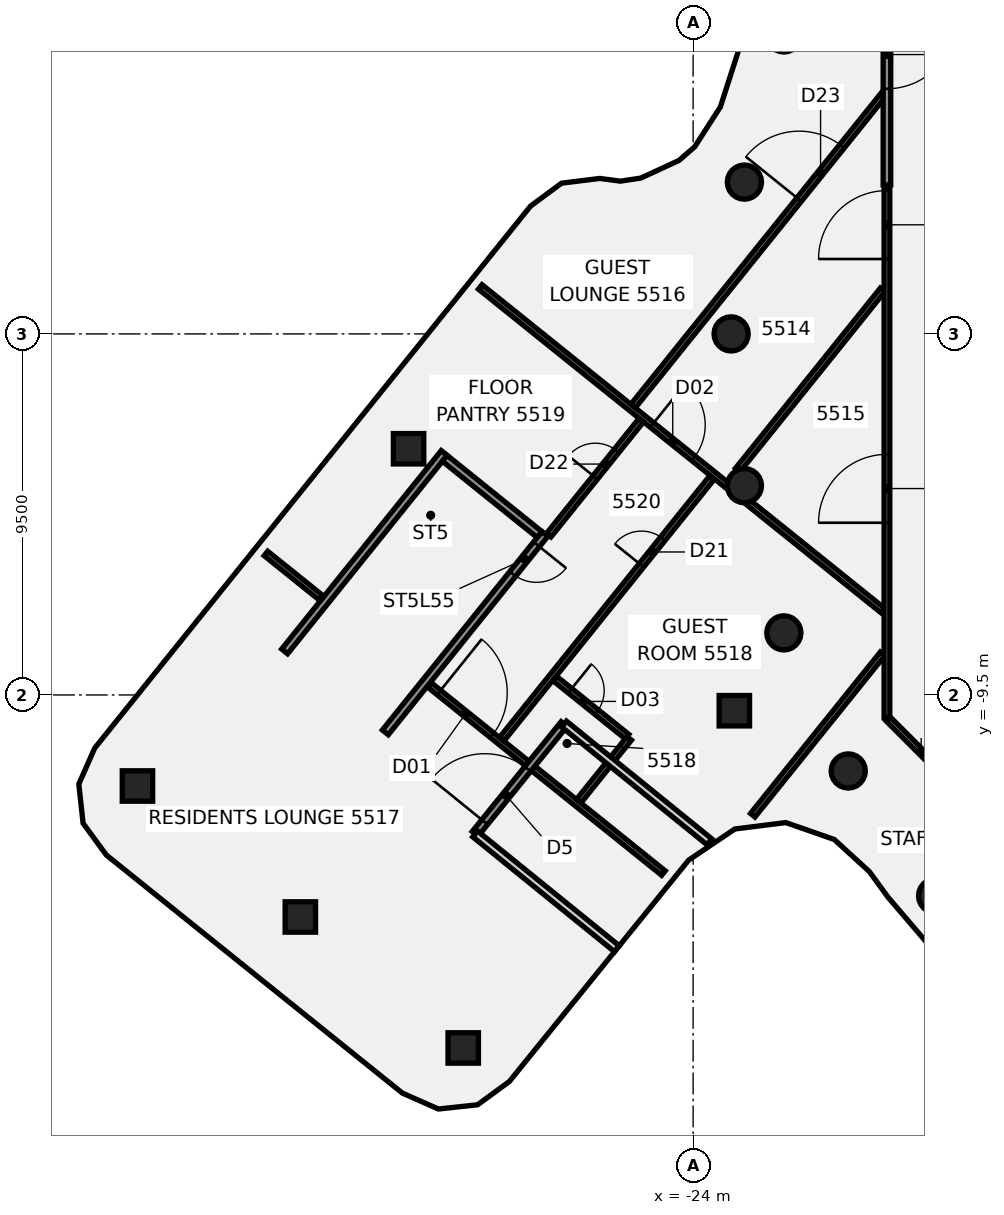
"""IFC4 building model, lengths in metres.
Left out: names, types, materials, properties, quantities, classifications, styles, units other than length and angle.
Written with IfcOpenShell. Run it as: python <this file> out.ifc"""

import sys

from ifc_helpers import new_model, si_unit, direction, frame, frame_2d, origin, origin_2d, place, context, subcontext, project, spatial, polyline, rectangle, circle, outline, extrude, element, fill, save


model = new_model("IFC4")
c1 = context("Model", 3, precision=1e-05, world=origin(), true_north=direction((0.0, 1.0)))
c2 = subcontext(c1, "Body", "Model", "MODEL_VIEW")
j1 = project(units=[si_unit("LENGTHUNIT", "METRE"), si_unit("PLANEANGLEUNIT", "RADIAN")], contexts=[c1])
p1 = place(None, origin())
s1 = spatial("IfcSite", under=j1, at=p1, CompositionType="ELEMENT")
p2 = place(p1, origin())
s2 = spatial("IfcBuilding", under=s1, at=p2, CompositionType="ELEMENT")
p3 = place(p2, frame((0.0, 0.0, 219.9)))
s3 = spatial("IfcBuildingStorey", under=s2, at=p3, CompositionType="ELEMENT", Elevation=219.9)
for number, where, z_axis, x_axis in (
    (1, (-22.651, 3.994, -0.14), (0.0, 0.0, 1.0), (1.0, 0.0, 0.0)),
    (2, (-23.0, 0.0, -0.14), (0.0, 0.0, 1.0), (1.0, 0.0, 0.0)),
    (3, (-22.651, -3.994, -0.14), (0.0, 0.0, 1.0), (1.0, 0.0, 0.0)),
    (4, (-21.613, -7.866, -0.14), (0.0, 0.0, 1.0), (1.0, 0.0, 0.0)),
    (5, (-19.919, -11.5, -0.14), (0.0, 0.0, 1.0), (1.0, 0.0, 0.0)),
    (6, (-17.619, -14.784, -0.14), (0.0, 0.0, 1.0), (1.0, 0.0, 0.0)),
):
    element("IfcColumn", number, at=place(p3, frame(where, z_axis=z_axis, x_axis=x_axis)), inside=s3, PredefinedType="COLUMN", context=c2, shape_type="SweptSolid", body=[
        extrude(circle(Radius=0.45, at=origin_2d()), origin(), (0.0, 0.0, 1.0), 3.6),
    ])
p4 = place(p3, frame((-22.915, -9.915, -0.134), z_axis=(0.050218113387, -0.004139601239, 0.998729695558), x_axis=(-0.7786689847, 0.626044507658, 0.04174789452)))
e7 = element("IfcColumn", 7, at=p4, inside=s3, PredefinedType="COLUMN", context=c2, shape_type="SweptSolid", body=[
    extrude(rectangle(XDim=0.8, YDim=0.8, at=origin_2d()), origin(), (0.0, 0.0, 1.0), 3.598),
])
p5 = place(p3, frame((-31.487, -3.022, -0.135), z_axis=(0.015743007279, -0.047839741947, 0.998730953166), x_axis=(0.626502812053, 0.778936132704, 0.027435882672)))
e8 = element("IfcColumn", 8, at=p5, inside=s3, PredefinedType="COLUMN", context=c2, shape_type="SweptSolid", body=[
    extrude(rectangle(XDim=0.8, YDim=0.8, at=origin_2d()), origin(), (0.0, 0.0, 1.0), 3.598),
])
p6 = place(p3, frame((-38.622, -11.896, -0.125), z_axis=(0.110836507046, -0.018348621509, 0.993669259258), x_axis=(-0.773649156908, 0.626012359155, 0.097854525701)))
e9 = element("IfcColumn", 9, at=p6, inside=s3, PredefinedType="COLUMN", context=c2, shape_type="SweptSolid", body=[
    extrude(rectangle(XDim=0.8, YDim=0.8, at=origin_2d()), origin(), (0.0, 0.0, 1.0), 3.606),
])
p7 = place(p3, frame((-34.336, -15.342, -0.127), z_axis=(0.127732671233, 0.003444931905, 0.991802650301), x_axis=(-0.773203207147, 0.626633422835, 0.097403048434)))
e10 = element("IfcColumn", 10, at=p7, inside=s3, PredefinedType="COLUMN", context=c2, shape_type="SweptSolid", body=[
    extrude(rectangle(XDim=0.8, YDim=0.8, at=origin_2d()), origin(), (0.0, 0.0, 1.0), 3.614),
])
p8 = place(p3, frame((-30.05, -18.788, -0.129), z_axis=(0.144430563508, 0.025048097727, 0.989197859442), x_axis=(-0.772342054291, 0.627776746317, 0.096871605529)))
e11 = element("IfcColumn", 11, at=p8, inside=s3, PredefinedType="COLUMN", context=c2, shape_type="SweptSolid", body=[
    extrude(rectangle(XDim=0.8, YDim=0.8, at=origin_2d()), origin(), (0.0, 0.0, 1.0), 3.626),
])
p9 = place(p3, frame((-18.872, -10.128, 0.0), z_axis=(0.0, 0.0, 1.0), x_axis=(0.707106781187, -0.707106781187, 0.0)))
e12 = element("IfcWall", 12, at=p9, inside=s3, PredefinedType="PARTITIONING", context=c2, shape_type="SweptSolid", body=[
    extrude(rectangle(XDim=2.465, YDim=0.15, at=frame_2d((1.232, 0.0))), origin(), (0.0, 0.0, 1.0), 2.864),
])
p10 = place(p3, frame((-35.242, -5.777, 0.0), z_axis=(0.0, 0.0, 1.0), x_axis=(0.779380699449, -0.626550656632, 0.0)))
e13 = element("IfcWall", 13, at=p10, inside=s3, PredefinedType="PARTITIONING", context=c2, shape_type="SweptSolid", body=[
    extrude(rectangle(XDim=1.859, YDim=0.15, at=frame_2d((0.93, 0.0))), origin(), (0.0, 0.0, 1.0), 2.864),
])
p11 = place(p3, frame((-30.925, -9.247, 0.0), z_axis=(0.0, 0.0, 1.0), x_axis=(0.779383084093, -0.626547690308, 0.0)))
e14 = element("IfcWall", 14, at=p11, inside=s3, PredefinedType="PARTITIONING", context=c2, shape_type="SweptSolid", body=[
    extrude(rectangle(XDim=7.883, YDim=0.15, at=frame_2d((3.942, 0.0))), origin(), (0.0, 0.0, 1.0), 2.864),
])
p12 = place(p11, frame((0.3, 0.0, 0.0)))
e15 = element("IfcOpeningElement", 15, at=p12, cuts=e14, PredefinedType="OPENING", context=c2, shape_type="SweptSolid", body=[
    extrude(rectangle(XDim=1.8, YDim=2.1, at=frame_2d((0.9, 1.05))), frame((0.0, 0.085, 0.0), z_axis=(0.0, -1.0, 0.0), x_axis=(1.0, 0.0, 0.0)), (0.0, 0.0, 1.0), 0.17),
])
p13 = place(p3, frame((-29.602, 1.236, 0.0), z_axis=(0.0, 0.0, 1.0), x_axis=(0.779408775424, -0.626515730681, 0.0)))
e16 = element("IfcWall", 16, at=p13, inside=s3, PredefinedType="PARTITIONING", context=c2, shape_type="SweptSolid", body=[
    extrude(rectangle(XDim=8.332, YDim=0.15, at=frame_2d((4.166, 0.0))), origin(), (0.0, 0.0, 1.0), 2.864),
])
p14 = place(p13, frame((5.799, 0.0, 0.0)))
e17 = element("IfcOpeningElement", 17, at=p14, cuts=e16, PredefinedType="OPENING", context=c2, shape_type="SweptSolid", body=[
    extrude(rectangle(XDim=1.4, YDim=2.1, at=frame_2d((0.7, 1.05))), frame((0.0, 0.085, 0.0), z_axis=(0.0, -1.0, 0.0), x_axis=(1.0, 0.0, 0.0)), (0.0, 0.0, 1.0), 0.17),
])
p15 = place(p3, frame((-22.555, -4.428, 0.0), z_axis=(0.0, 0.0, 1.0), x_axis=(0.779423896045, -0.626496919604, 0.0)))
e18 = element("IfcWall", 18, at=p15, inside=s3, PredefinedType="PARTITIONING", context=c2, shape_type="SweptSolid", body=[
    extrude(rectangle(XDim=4.556, YDim=0.15, at=frame_2d((2.278, 0.0))), origin(), (0.0, 0.0, 1.0), 2.864),
])
p16 = place(p3, frame((-27.646, -9.062, 0.0), z_axis=(0.0, 0.0, 1.0), x_axis=(0.779279142781, -0.626676964334, 0.0)))
e19 = element("IfcWall", 19, at=p16, inside=s3, PredefinedType="PARTITIONING", context=c2, shape_type="SweptSolid", body=[
    extrude(rectangle(XDim=2.446, YDim=0.15, at=frame_2d((1.223, 0.0))), origin(), (0.0, 0.0, 1.0), 2.864),
])
p17 = place(p16, frame((0.52, 0.0, 0.0)))
e20 = element("IfcOpeningElement", 20, at=p17, cuts=e19, PredefinedType="OPENING", context=c2, shape_type="SweptSolid", body=[
    extrude(rectangle(XDim=0.9, YDim=2.1, at=frame_2d((0.45, 1.05))), frame((0.0, 0.085, 0.0), z_axis=(0.0, -1.0, 0.0), x_axis=(1.0, 0.0, 0.0)), (0.0, 0.0, 1.0), 0.17),
])
p18 = place(p3, frame((-29.036, -10.665, 0.0), z_axis=(0.0, 0.0, 1.0), x_axis=(0.626350653384, 0.779541441493, 0.0)))
e21 = element("IfcWall", 21, at=p18, inside=s3, PredefinedType="PARTITIONING", context=c2, shape_type="SweptSolid", body=[
    extrude(rectangle(XDim=8.84, YDim=0.15, at=frame_2d((4.42, 0.0))), origin(), (0.0, 0.0, 1.0), 2.864),
])
p19 = place(p18, frame((5.87, 0.0, 0.0)))
e22 = element("IfcOpeningElement", 22, at=p19, cuts=e21, PredefinedType="OPENING", context=c2, shape_type="SweptSolid", body=[
    extrude(rectangle(XDim=0.9, YDim=2.1, at=frame_2d((0.45, 1.05))), frame((0.0, 0.085, 0.0), z_axis=(0.0, -1.0, 0.0), x_axis=(1.0, 0.0, 0.0)), (0.0, 0.0, 1.0), 0.17),
])
p20 = place(p3, frame((-27.798, -5.295, 0.0), z_axis=(0.0, 0.0, 1.0), x_axis=(0.626664805056, 0.779288920814, 0.0)))
e23 = element("IfcWall", 23, at=p20, inside=s3, PredefinedType="PARTITIONING", context=c2, shape_type="SweptSolid", body=[
    extrude(rectangle(XDim=3.881, YDim=0.15, at=frame_2d((1.94, 0.0))), origin(), (0.0, 0.0, 1.0), 2.864),
])
p21 = place(p20, frame((1.95, 0.0, 0.0)))
e24 = element("IfcOpeningElement", 24, at=p21, cuts=e23, PredefinedType="OPENING", context=c2, shape_type="SweptSolid", body=[
    extrude(rectangle(XDim=0.9, YDim=2.1, at=frame_2d((0.45, 1.05))), frame((0.0, 0.085, 0.0), z_axis=(0.0, -1.0, 0.0), x_axis=(1.0, 0.0, 0.0)), (0.0, 0.0, 1.0), 0.17),
])
p22 = place(p3, frame((-27.01, -12.294, 0.0), z_axis=(0.0, 0.0, 1.0), x_axis=(0.626939515837, 0.77906793252, 0.0)))
e25 = element("IfcWall", 25, at=p22, inside=s3, PredefinedType="PARTITIONING", context=c2, shape_type="SweptSolid", body=[
    extrude(rectangle(XDim=2.12, YDim=0.15, at=frame_2d((1.06, 0.0))), origin(), (0.0, 0.0, 1.0), 2.864),
])
p23 = place(p3, frame((-25.578, -1.897, 0.0), z_axis=(0.0, 0.0, 1.0), x_axis=(0.626651590672, 0.779299546971, 0.0)))
e26 = element("IfcWall", 26, at=p23, inside=s3, PredefinedType="PARTITIONING", context=c2, shape_type="SweptSolid", body=[
    extrude(rectangle(XDim=10.656, YDim=0.15, at=frame_2d((5.328, 0.0))), origin(), (0.0, 0.0, 1.0), 2.864),
])
p24 = place(p23, frame((6.97, 0.0, 0.0)))
e27 = element("IfcOpeningElement", 27, at=p24, cuts=e26, PredefinedType="OPENING", context=c2, shape_type="SweptSolid", body=[
    extrude(rectangle(XDim=1.8, YDim=2.1, at=frame_2d((0.9, 1.05))), frame((0.0, 0.085, 0.0), z_axis=(0.0, -1.0, 0.0), x_axis=(1.0, 0.0, 0.0)), (0.0, 0.0, 1.0), 0.17),
])
p25 = place(p3, frame((-22.826, -3.581, 0.0), z_axis=(0.0, 0.0, 1.0), x_axis=(0.626622427276, 0.779322996988, 0.0)))
e28 = element("IfcWall", 28, at=p25, inside=s3, PredefinedType="PARTITIONING", context=c2, shape_type="SweptSolid", body=[
    extrude(rectangle(XDim=6.08, YDim=0.15, at=frame_2d((3.04, 0.0))), origin(), (0.0, 0.0, 1.0), 2.864),
])
p26 = place(p3, frame((-22.432, -12.665, 0.0), z_axis=(0.0, 0.0, 1.0), x_axis=(0.626703070083, 0.779258148464, 0.0)))
e29 = element("IfcWall", 29, at=p26, inside=s3, PredefinedType="PARTITIONING", context=c2, shape_type="SweptSolid", body=[
    extrude(rectangle(XDim=5.451, YDim=0.15, at=frame_2d((2.725, 0.0))), origin(), (0.0, 0.0, 1.0), 2.864),
])
p27 = place(p3, frame((-18.9, -10.1, 0.0), z_axis=(0.0, 0.0, 1.0), x_axis=(0.0, 1.0, 0.0)))
e30 = element("IfcWall", 30, at=p27, inside=s3, PredefinedType="PARTITIONING", context=c2, shape_type="SweptSolid", body=[
    extrude(rectangle(XDim=13.921, YDim=0.15, at=frame_2d((6.96, 0.0))), origin(), (0.0, 0.0, 1.0), 2.864),
])
p28 = place(p27, frame((12.071, 0.0, 0.0)))
e31 = element("IfcOpeningElement", 31, at=p28, cuts=e30, PredefinedType="OPENING", context=c2, shape_type="SweptSolid", body=[
    extrude(rectangle(XDim=1.8, YDim=2.1, at=frame_2d((0.9, 1.05))), frame((0.0, 0.085, 0.0), z_axis=(0.0, -1.0, 0.0), x_axis=(1.0, 0.0, 0.0)), (0.0, 0.0, 1.0), 0.17),
])
p29 = place(p27, frame((5.131, 0.0, 0.0)))
e32 = element("IfcOpeningElement", 32, at=p29, cuts=e30, PredefinedType="OPENING", context=c2, shape_type="SweptSolid", body=[
    extrude(rectangle(XDim=1.8, YDim=2.1, at=frame_2d((0.9, 1.05))), frame((0.0, 0.085, 0.0), z_axis=(0.0, -1.0, 0.0), x_axis=(1.0, 0.0, 0.0)), (0.0, 0.0, 1.0), 0.17),
])
p30 = place(p3, frame((-18.9, 9.5, 0.0), z_axis=(0.0, 0.0, 1.0), x_axis=(0.0, -1.0, 0.0)))
e33 = element("IfcWall", 33, at=p30, inside=s3, PredefinedType="SOLIDWALL", context=c2, shape_type="SweptSolid", body=[
    extrude(rectangle(XDim=5.579, YDim=0.2, at=frame_2d((2.79, 0.0))), origin(), (0.0, 0.0, 1.0), 2.964),
])
p31 = place(p30, frame((1.25, 0.0, 0.0)))
e34 = element("IfcOpeningElement", 34, at=p31, cuts=e33, PredefinedType="OPENING", context=c2, shape_type="SweptSolid", body=[
    extrude(rectangle(XDim=1.8, YDim=2.4, at=frame_2d((0.9, 1.2))), frame((0.0, 0.11, 0.0), z_axis=(0.0, -1.0, 0.0), x_axis=(1.0, 0.0, 0.0)), (0.0, 0.0, 1.0), 0.22),
])
p32 = place(p3, frame((-29.737, -13.156, 0.0), z_axis=(0.0, 0.0, 1.0), x_axis=(0.629422930753, 0.77706291524, 0.0)))
e35 = element("IfcWall", 35, at=p32, inside=s3, PredefinedType="SOLIDWALL", context=c2, shape_type="SweptSolid", body=[
    extrude(rectangle(XDim=3.719, YDim=0.2, at=frame_2d((1.859, 0.0))), origin(), (0.0, 0.0, 1.0), 2.864),
])
p33 = place(p32, frame((0.4, 0.0, 0.0)))
e36 = element("IfcOpeningElement", 36, at=p33, cuts=e35, PredefinedType="OPENING", context=c2, shape_type="SweptSolid", body=[
    extrude(rectangle(XDim=1.8, YDim=2.4, at=frame_2d((0.9, 1.2))), frame((0.0, 0.11, 0.0), z_axis=(0.0, -1.0, 0.0), x_axis=(1.0, 0.0, 0.0)), (0.0, 0.0, 1.0), 0.22),
])
p34 = place(p3, frame((-29.737, -13.156, 0.0), z_axis=(0.0, 0.0, 1.0), x_axis=(0.777068356251, -0.629416213418, 0.0)))
e37 = element("IfcWall", 37, at=p34, inside=s3, PredefinedType="SOLIDWALL", context=c2, shape_type="SweptSolid", body=[
    extrude(rectangle(XDim=4.8, YDim=0.2, at=frame_2d((2.4, 0.0))), origin(), (0.0, 0.0, 1.0), 3.014),
])
p35 = place(p3, frame((-27.396, -10.267, 0.0), z_axis=(0.0, 0.0, 1.0), x_axis=(0.77707382843, -0.629409457483, 0.0)))
e38 = element("IfcWall", 38, at=p35, inside=s3, PredefinedType="SOLIDWALL", context=c2, shape_type="SweptSolid", body=[
    extrude(rectangle(XDim=4.92, YDim=0.2, at=frame_2d((2.46, 0.0))), origin(), (0.0, 0.0, 1.0), 3.014),
])
p36 = place(p3, frame((-27.901, -5.264, -0.14), z_axis=(0.0, 0.0, 1.0), x_axis=(-0.626674952142, -0.779280760932, 0.0)))
e39 = element("IfcWall", 39, at=p36, inside=s3, PredefinedType="SHEAR", context=c2, shape_type="SweptSolid", body=[
    extrude(rectangle(XDim=6.7, YDim=0.2, at=frame_2d((3.35, 0.0))), origin(), (0.0, 0.0, 1.0), 3.004),
])
p37 = place(p36, frame((0.35, 0.0, 0.0)))
e40 = element("IfcOpeningElement", 40, at=p37, cuts=e39, PredefinedType="OPENING", context=c2, shape_type="SweptSolid", body=[
    extrude(rectangle(XDim=1.0, YDim=2.1, at=frame_2d((0.5, 1.05))), frame((0.0, 0.11, 0.0), z_axis=(0.0, -1.0, 0.0), x_axis=(1.0, 0.0, 0.0)), (0.0, 0.0, 1.0), 0.22),
])
p38 = place(p3, frame((-30.551, -3.133, -0.14), z_axis=(0.0, 0.0, 1.0), x_axis=(-0.626652822867, -0.779298556134, 0.0)))
e41 = element("IfcWall", 41, at=p38, inside=s3, PredefinedType="SHEAR", context=c2, shape_type="SweptSolid", body=[
    extrude(rectangle(XDim=6.7, YDim=0.2, at=frame_2d((3.35, 0.0))), origin(), (0.0, 0.0, 1.0), 3.004),
])
p39 = place(p3, frame((-30.535, -3.274, -0.14), z_axis=(0.0, 0.0, 1.0), x_axis=(0.779273387841, -0.626684120592, 0.0)))
e42 = element("IfcWall", 42, at=p39, inside=s3, PredefinedType="SHEAR", context=c2, shape_type="SweptSolid", body=[
    extrude(rectangle(XDim=3.2, YDim=0.2, at=frame_2d((1.6, 0.0))), origin(), (0.0, 0.0, 1.0), 3.004),
])
p40 = place(p3, frame((0.0, 0.0, -0.14)))
e43 = element("IfcWall", 43, at=p40, inside=s3, PredefinedType="SHEAR", context=c2, shape_type="SweptSolid", body=[
    extrude(outline(polyline([(-34.546, -8.261), (-34.671, -8.417), (-32.178, -10.422), (-32.052, -10.266), (-34.546, -8.261)])), origin(), (0.0, 0.0, 1.0), 3.004),
])
p41 = place(p12, frame((1.8, 0.0, 0.0), z_axis=(0.0, 0.0, 1.0), x_axis=(-1.0, 0.0, 0.0)))
e44 = element("IfcDoor", 44, at=p41, inside=s3, OperationType="DOUBLE_DOOR_SINGLE_SWING", PredefinedType="DOOR", context=c2, shape_type="SweptSolid", body=[
    extrude(rectangle(XDim=1.8, YDim=2.1, at=frame_2d((0.9, 1.05))), frame((0.0, 0.025, 0.0), z_axis=(0.0, -1.0, 0.0), x_axis=(1.0, 0.0, 0.0)), (0.0, 0.0, 1.0), 0.05),
])
fill(e15, e44)
p42 = place(p14, origin())
e45 = element("IfcDoor", 45, at=p42, inside=s3, OperationType="DOUBLE_DOOR_SINGLE_SWING", PredefinedType="DOOR", context=c2, shape_type="SweptSolid", body=[
    extrude(rectangle(XDim=1.4, YDim=2.1, at=frame_2d((0.7, 1.05))), frame((0.0, 0.025, 0.0), z_axis=(0.0, -1.0, 0.0), x_axis=(1.0, 0.0, 0.0)), (0.0, 0.0, 1.0), 0.05),
])
fill(e17, e45)
p43 = place(p17, frame((0.9, 0.0, 0.0), z_axis=(0.0, 0.0, 1.0), x_axis=(-1.0, 0.0, 0.0)))
e46 = element("IfcDoor", 46, at=p43, inside=s3, OperationType="SINGLE_SWING_LEFT", PredefinedType="DOOR", context=c2, shape_type="SweptSolid", body=[
    extrude(rectangle(XDim=0.9, YDim=2.1, at=frame_2d((0.45, 1.05))), frame((0.0, 0.025, 0.0), z_axis=(0.0, -1.0, 0.0), x_axis=(1.0, 0.0, 0.0)), (0.0, 0.0, 1.0), 0.05),
])
fill(e20, e46)
p44 = place(p19, frame((0.9, 0.0, 0.0), z_axis=(0.0, 0.0, 1.0), x_axis=(-1.0, 0.0, 0.0)))
e47 = element("IfcDoor", 47, at=p44, inside=s3, OperationType="SINGLE_SWING_RIGHT", PredefinedType="DOOR", context=c2, shape_type="SweptSolid", body=[
    extrude(rectangle(XDim=0.9, YDim=2.1, at=frame_2d((0.45, 1.05))), frame((0.0, 0.025, 0.0), z_axis=(0.0, -1.0, 0.0), x_axis=(1.0, 0.0, 0.0)), (0.0, 0.0, 1.0), 0.05),
])
fill(e22, e47)
p45 = place(p21, origin())
e48 = element("IfcDoor", 48, at=p45, inside=s3, OperationType="SINGLE_SWING_LEFT", PredefinedType="DOOR", context=c2, shape_type="SweptSolid", body=[
    extrude(rectangle(XDim=0.9, YDim=2.1, at=frame_2d((0.45, 1.05))), frame((0.0, 0.025, 0.0), z_axis=(0.0, -1.0, 0.0), x_axis=(1.0, 0.0, 0.0)), (0.0, 0.0, 1.0), 0.05),
])
fill(e24, e48)
p46 = place(p24, origin())
e49 = element("IfcDoor", 49, at=p46, inside=s3, OperationType="DOUBLE_DOOR_SINGLE_SWING", PredefinedType="DOOR", context=c2, shape_type="SweptSolid", body=[
    extrude(rectangle(XDim=1.8, YDim=2.1, at=frame_2d((0.9, 1.05))), frame((0.0, 0.025, 0.0), z_axis=(0.0, -1.0, 0.0), x_axis=(1.0, 0.0, 0.0)), (0.0, 0.0, 1.0), 0.05),
])
fill(e27, e49)
p47 = place(p28, frame((1.8, 0.0, 0.0), z_axis=(0.0, 0.0, 1.0), x_axis=(-1.0, 0.0, 0.0)))
e50 = element("IfcDoor", 50, at=p47, inside=s3, OperationType="DOUBLE_DOOR_SINGLE_SWING", PredefinedType="DOOR", context=c2, shape_type="SweptSolid", body=[
    extrude(rectangle(XDim=1.8, YDim=2.1, at=frame_2d((0.9, 1.05))), frame((0.0, 0.025, 0.0), z_axis=(0.0, -1.0, 0.0), x_axis=(1.0, 0.0, 0.0)), (0.0, 0.0, 1.0), 0.05),
])
fill(e31, e50)
p48 = place(p29, origin())
e51 = element("IfcDoor", 51, at=p48, inside=s3, OperationType="DOUBLE_DOOR_SINGLE_SWING", PredefinedType="DOOR", context=c2, shape_type="SweptSolid", body=[
    extrude(rectangle(XDim=1.8, YDim=2.1, at=frame_2d((0.9, 1.05))), frame((0.0, 0.025, 0.0), z_axis=(0.0, -1.0, 0.0), x_axis=(1.0, 0.0, 0.0)), (0.0, 0.0, 1.0), 0.05),
])
fill(e32, e51)
p49 = place(p31, origin())
e52 = element("IfcDoor", 52, at=p49, inside=s3, OperationType="SINGLE_SWING_LEFT", PredefinedType="DOOR", context=c2, shape_type="SweptSolid", body=[
    extrude(rectangle(XDim=1.8, YDim=2.4, at=frame_2d((0.9, 1.2))), frame((0.0, 0.025, 0.0), z_axis=(0.0, -1.0, 0.0), x_axis=(1.0, 0.0, 0.0)), (0.0, 0.0, 1.0), 0.05),
])
fill(e34, e52)
p50 = place(p33, origin())
e53 = element("IfcDoor", 53, at=p50, inside=s3, OperationType="SINGLE_SWING_LEFT", PredefinedType="DOOR", context=c2, shape_type="SweptSolid", body=[
    extrude(rectangle(XDim=1.8, YDim=2.4, at=frame_2d((0.9, 1.2))), frame((0.0, 0.025, 0.0), z_axis=(0.0, -1.0, 0.0), x_axis=(1.0, 0.0, 0.0)), (0.0, 0.0, 1.0), 0.05),
])
fill(e36, e53)
p51 = place(p37, origin())
e54 = element("IfcDoor", 54, at=p51, inside=s3, OperationType="SINGLE_SWING_LEFT", PredefinedType="DOOR", context=c2, shape_type="SweptSolid", body=[
    extrude(rectangle(XDim=1.0, YDim=2.1, at=frame_2d((0.5, 1.05))), frame((0.0, 0.025, 0.0), z_axis=(0.0, -1.0, 0.0), x_axis=(1.0, 0.0, 0.0)), (0.0, 0.0, 1.0), 0.05),
])
fill(e40, e54)
save(model, sys.argv[1])
